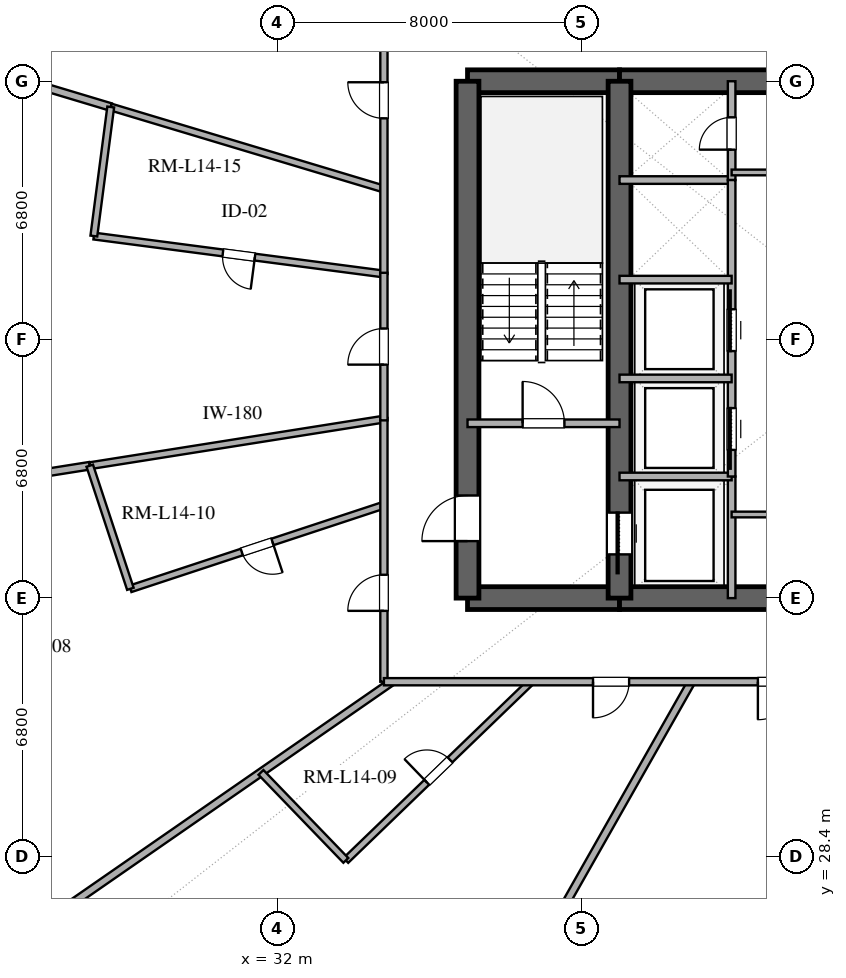
"""IFC4 building model, lengths in metres.
Left out: names, types, materials, properties, quantities, classifications, styles, units other than length and angle.
Written with IfcOpenShell. Run it as: python <this file> out.ifc"""

import sys

from ifc_helpers import new_model, si_unit, direction, frame, frame_2d, origin, place, context, subcontext, project, spatial, rectangle, extrude, element, fill, save


model = new_model("IFC4")
c1 = context("Model", 3, precision=1e-05, world=origin(), true_north=direction((0.0, 1.0)))
c2 = subcontext(c1, "Body", "Model", "MODEL_VIEW")
j1 = project(units=[si_unit("LENGTHUNIT", "METRE"), si_unit("PLANEANGLEUNIT", "RADIAN")], contexts=[c1])
p1 = place(None, origin())
s1 = spatial("IfcSite", under=j1, at=p1, CompositionType="ELEMENT")
p2 = place(p1, origin())
s2 = spatial("IfcBuilding", under=s1, at=p2, CompositionType="ELEMENT")
p3 = place(p2, frame((0.0, 0.0, 60.6)))
s3 = spatial("IfcBuildingStorey", under=s2, at=p3, CompositionType="ELEMENT", Elevation=60.6)
p4 = place(p3, frame((37.0, 35.2, 0.0), z_axis=(0.0, 0.0, 1.0), x_axis=(1.0, 0.0, 0.0)))
e1 = element("IfcWall", 1, at=p4, inside=s3, PredefinedType="SHEAR", context=c2, shape_type="SweptSolid", body=[
    extrude(rectangle(XDim=4.0, YDim=0.6, at=frame_2d((2.0, 0.0))), origin(), (0.0, 0.0, 1.0), 3.38),
])
p5 = place(p3, frame((41.0, 35.2, 0.0), z_axis=(0.0, 0.0, 1.0), x_axis=(1.0, 0.0, 0.0)))
e2 = element("IfcWall", 2, at=p5, inside=s3, PredefinedType="SHEAR", context=c2, shape_type="SweptSolid", body=[
    extrude(rectangle(XDim=14.0, YDim=0.6, at=frame_2d((7.0, 0.0))), origin(), (0.0, 0.0, 1.0), 3.38),
])
p6 = place(p5, frame((6.1, 0.0, 0.0)))
e3 = element("IfcOpeningElement", 3, at=p6, cuts=e2, PredefinedType="OPENING", context=c2, shape_type="SweptSolid", body=[
    extrude(rectangle(XDim=1.8, YDim=2.25, at=frame_2d((0.9, 1.125))), frame((0.0, 0.31, 0.0), z_axis=(0.0, -1.0, 0.0), x_axis=(1.0, 0.0, 0.0)), (0.0, 0.0, 1.0), 0.62),
])
p7 = place(p3, frame((37.0, 48.8, 0.0), z_axis=(0.0, 0.0, 1.0), x_axis=(1.0, 0.0, 0.0)))
e4 = element("IfcWall", 4, at=p7, inside=s3, PredefinedType="SHEAR", context=c2, shape_type="SweptSolid", body=[
    extrude(rectangle(XDim=4.0, YDim=0.6, at=frame_2d((2.0, 0.0))), origin(), (0.0, 0.0, 1.0), 3.38),
])
p8 = place(p3, frame((41.0, 48.8, 0.0), z_axis=(0.0, 0.0, 1.0), x_axis=(1.0, 0.0, 0.0)))
e5 = element("IfcWall", 5, at=p8, inside=s3, PredefinedType="SHEAR", context=c2, shape_type="SweptSolid", body=[
    extrude(rectangle(XDim=14.0, YDim=0.6, at=frame_2d((7.0, 0.0))), origin(), (0.0, 0.0, 1.0), 3.38),
])
p9 = place(p8, frame((6.1, 0.0, 0.0)))
e6 = element("IfcOpeningElement", 6, at=p9, cuts=e5, PredefinedType="OPENING", context=c2, shape_type="SweptSolid", body=[
    extrude(rectangle(XDim=1.8, YDim=2.25, at=frame_2d((0.9, 1.125))), frame((0.0, 0.31, 0.0), z_axis=(0.0, -1.0, 0.0), x_axis=(1.0, 0.0, 0.0)), (0.0, 0.0, 1.0), 0.62),
])
p10 = place(p3, frame((37.0, 35.2, 0.0), z_axis=(0.0, 0.0, 1.0), x_axis=(0.0, 1.0, 0.0)))
e7 = element("IfcWall", 7, at=p10, inside=s3, PredefinedType="SHEAR", context=c2, shape_type="SweptSolid", body=[
    extrude(rectangle(XDim=13.6, YDim=0.6, at=frame_2d((6.8, 0.0))), origin(), (0.0, 0.0, 1.0), 3.38),
])
p11 = place(p10, frame((1.5, 0.0, 0.0)))
e8 = element("IfcOpeningElement", 8, at=p11, cuts=e7, PredefinedType="OPENING", context=c2, shape_type="SweptSolid", body=[
    extrude(rectangle(XDim=1.2, YDim=2.15, at=frame_2d((0.6, 1.075))), frame((0.0, 0.31, 0.0), z_axis=(0.0, -1.0, 0.0), x_axis=(1.0, 0.0, 0.0)), (0.0, 0.0, 1.0), 0.62),
])
p12 = place(p3, frame((41.0, 35.2, 0.0), z_axis=(0.0, 0.0, 1.0), x_axis=(0.0, 1.0, 0.0)))
e9 = element("IfcWall", 9, at=p12, inside=s3, PredefinedType="SHEAR", context=c2, shape_type="SweptSolid", body=[
    extrude(rectangle(XDim=13.6, YDim=0.6, at=frame_2d((6.8, 0.0))), origin(), (0.0, 0.0, 1.0), 3.38),
])
p13 = place(p12, frame((1.15, 0.0, 0.0)))
e10 = element("IfcOpeningElement", 10, at=p13, cuts=e9, PredefinedType="OPENING", context=c2, shape_type="SweptSolid", body=[
    extrude(rectangle(XDim=1.1, YDim=2.2, at=frame_2d((0.55, 1.1))), frame((0.0, 0.31, 0.0), z_axis=(0.0, -1.0, 0.0), x_axis=(1.0, 0.0, 0.0)), (0.0, 0.0, 1.0), 0.62),
])
p14 = place(p3, frame((37.0, 39.8, 0.0), z_axis=(0.0, 0.0, 1.0), x_axis=(1.0, 0.0, 0.0)))
e11 = element("IfcWall", 11, at=p14, inside=s3, PredefinedType="SOLIDWALL", context=c2, shape_type="SweptSolid", body=[
    extrude(rectangle(XDim=4.0, YDim=0.2, at=frame_2d((2.0, 0.0))), origin(), (0.0, 0.0, 1.0), 2.74),
])
p15 = place(p14, frame((1.45, 0.0, 0.0)))
e12 = element("IfcOpeningElement", 12, at=p15, cuts=e11, PredefinedType="OPENING", context=c2, shape_type="SweptSolid", body=[
    extrude(rectangle(XDim=1.1, YDim=2.15, at=frame_2d((0.55, 1.075))), frame((0.0, 0.11, 0.0), z_axis=(0.0, -1.0, 0.0), x_axis=(1.0, 0.0, 0.0)), (0.0, 0.0, 1.0), 0.22),
])
p16 = place(p3, frame((43.95, 35.2, 0.0), z_axis=(0.0, 0.0, 1.0), x_axis=(0.0, 1.0, 0.0)))
e13 = element("IfcWall", 13, at=p16, inside=s3, PredefinedType="SOLIDWALL", context=c2, shape_type="SweptSolid", body=[
    extrude(rectangle(XDim=3.2, YDim=0.2, at=frame_2d((1.6, 0.0))), origin(), (0.0, 0.0, 1.0), 2.74),
])
for number, where, z_axis, x_axis in (
    (14, (41.0, 38.4, 0.0), (0.0, 0.0, 1.0), (1.0, 0.0, 0.0)),
    (15, (41.0, 46.2, 0.0), (0.0, 0.0, 1.0), (1.0, 0.0, 0.0)),
):
    element("IfcWall", number, at=place(p3, frame(where, z_axis=z_axis, x_axis=x_axis)), inside=s3, PredefinedType="SOLIDWALL", context=c2, shape_type="SweptSolid", body=[
        extrude(rectangle(XDim=2.95, YDim=0.2, at=frame_2d((1.475, 0.0))), origin(), (0.0, 0.0, 1.0), 2.74),
    ])
p17 = place(p3, frame((43.95, 46.2, 0.0), z_axis=(0.0, 0.0, 1.0), x_axis=(0.0, 1.0, 0.0)))
e16 = element("IfcWall", 16, at=p17, inside=s3, PredefinedType="SOLIDWALL", context=c2, shape_type="SweptSolid", body=[
    extrude(rectangle(XDim=2.6, YDim=0.2, at=frame_2d((1.3, 0.0))), origin(), (0.0, 0.0, 1.0), 2.74),
])
p18 = place(p17, frame((0.8, 0.0, 0.0)))
e17 = element("IfcOpeningElement", 17, at=p18, cuts=e16, PredefinedType="OPENING", context=c2, shape_type="SweptSolid", body=[
    extrude(rectangle(XDim=0.85, YDim=2.15, at=frame_2d((0.425, 1.075))), frame((0.0, 0.11, 0.0), z_axis=(0.0, -1.0, 0.0), x_axis=(1.0, 0.0, 0.0)), (0.0, 0.0, 1.0), 0.22),
])
p19 = place(p3, frame((43.95, 38.4, 0.0), z_axis=(0.0, 0.0, 1.0), x_axis=(0.0, 1.0, 0.0)))
e18 = element("IfcWall", 18, at=p19, inside=s3, PredefinedType="SOLIDWALL", context=c2, shape_type="SweptSolid", body=[
    extrude(rectangle(XDim=7.8, YDim=0.2, at=frame_2d((3.9, 0.0))), origin(), (0.0, 0.0, 1.0), 2.74),
])
p20 = place(p19, frame((0.7, 0.0, 0.0)))
e19 = element("IfcOpeningElement", 19, at=p20, cuts=e18, PredefinedType="OPENING", context=c2, shape_type="SweptSolid", body=[
    extrude(rectangle(XDim=1.1, YDim=2.2, at=frame_2d((0.55, 1.1))), frame((0.0, 0.11, 0.0), z_axis=(0.0, -1.0, 0.0), x_axis=(1.0, 0.0, 0.0)), (0.0, 0.0, 1.0), 0.22),
])
p21 = place(p19, frame((3.3, 0.0, 0.0)))
e20 = element("IfcOpeningElement", 20, at=p21, cuts=e18, PredefinedType="OPENING", context=c2, shape_type="SweptSolid", body=[
    extrude(rectangle(XDim=1.1, YDim=2.2, at=frame_2d((0.55, 1.1))), frame((0.0, 0.11, 0.0), z_axis=(0.0, -1.0, 0.0), x_axis=(1.0, 0.0, 0.0)), (0.0, 0.0, 1.0), 0.22),
])
for number, where, z_axis, x_axis in (
    (21, (41.0, 40.98, 0.0), (0.0, 0.0, 1.0), (1.0, 0.0, 0.0)),
    (22, (41.0, 43.58, 0.0), (0.0, 0.0, 1.0), (1.0, 0.0, 0.0)),
):
    element("IfcWall", number, at=place(p3, frame(where, z_axis=z_axis, x_axis=x_axis)), inside=s3, PredefinedType="SOLIDWALL", context=c2, shape_type="SweptSolid", body=[
        extrude(rectangle(XDim=2.95, YDim=0.2, at=frame_2d((1.475, 0.0))), origin(), (0.0, 0.0, 1.0), 2.74),
    ])
for number, where, z_axis, x_axis in (
    (23, (43.95, 37.4, 0.0), (0.0, 0.0, 1.0), (1.0, 0.0, 0.0)),
    (24, (43.95, 46.4, 0.0), (0.0, 0.0, 1.0), (1.0, 0.0, 0.0)),
):
    element("IfcWall", number, at=place(p3, frame(where, z_axis=z_axis, x_axis=x_axis)), inside=s3, PredefinedType="PARTITIONING", context=c2, shape_type="SweptSolid", body=[
        extrude(rectangle(XDim=2.25, YDim=0.15, at=frame_2d((1.125, 0.0))), origin(), (0.0, 0.0, 1.0), 2.74),
    ])
p22 = place(p3, frame((42.893, 33.0, 0.0), z_axis=(0.0, 0.0, 1.0), x_axis=(-0.493512300658, -0.869738816599, 0.0)))
e25 = element("IfcWall", 25, at=p22, inside=s3, PredefinedType="PARTITIONING", context=c2, shape_type="SweptSolid", body=[
    extrude(rectangle(XDim=14.938, YDim=0.2, at=frame_2d((7.469, 0.0))), origin(), (0.0, 0.0, 1.0), 2.74),
])
p23 = place(p3, frame((18.271, 37.292, 0.0), z_axis=(0.0, 0.0, 1.0), x_axis=(0.987691229297, 0.156416225401, 0.0)))
e26 = element("IfcWall", 26, at=p23, inside=s3, PredefinedType="PARTITIONING", context=c2, shape_type="SweptSolid", body=[
    extrude(rectangle(XDim=8.898, YDim=0.2, at=frame_2d((4.449, 0.0))), origin(), (0.0, 0.0, 1.0), 2.74),
])
p24 = place(p3, frame((19.184, 50.653, 0.0), z_axis=(0.0, 0.0, 1.0), x_axis=(0.957749889613, -0.287602414708, 0.0)))
e27 = element("IfcWall", 27, at=p24, inside=s3, PredefinedType="PARTITIONING", context=c2, shape_type="SweptSolid", body=[
    extrude(rectangle(XDim=8.8, YDim=0.2, at=frame_2d((4.4, 0.0))), origin(), (0.0, 0.0, 1.0), 2.74),
])
p25 = place(p3, frame((35.009, 33.0, 0.0), z_axis=(0.0, 0.0, 1.0), x_axis=(-0.821999402566, -0.569488351226, 0.0)))
e28 = element("IfcWall", 28, at=p25, inside=s3, PredefinedType="PARTITIONING", context=c2, shape_type="SweptSolid", body=[
    extrude(rectangle(XDim=12.266, YDim=0.2, at=frame_2d((6.133, 0.0))), origin(), (0.0, 0.0, 1.0), 2.74),
])
p26 = place(p3, frame((27.06, 38.683, 0.0), z_axis=(0.0, 0.0, 1.0), x_axis=(0.987690363599, 0.156421691762, 0.0)))
e29 = element("IfcWall", 29, at=p26, inside=s3, PredefinedType="PLUMBINGWALL", context=c2, shape_type="SweptSolid", body=[
    extrude(rectangle(XDim=7.837, YDim=0.18, at=frame_2d((3.918, 0.0))), origin(), (0.0, 0.0, 1.0), 2.74),
])
p27 = place(p3, frame((34.8, 43.728, 0.0), z_axis=(0.0, 0.0, 1.0), x_axis=(-0.991543548491, 0.129774386708, 0.0)))
e30 = element("IfcWall", 30, at=p27, inside=s3, PredefinedType="PLUMBINGWALL", context=c2, shape_type="SweptSolid", body=[
    extrude(rectangle(XDim=7.698, YDim=0.18, at=frame_2d((3.849, 0.0))), origin(), (0.0, 0.0, 1.0), 2.74),
])
p28 = place(p27, frame((3.424, 0.0, 0.0)))
e31 = element("IfcOpeningElement", 31, at=p28, cuts=e30, PredefinedType="OPENING", context=c2, shape_type="SweptSolid", body=[
    extrude(rectangle(XDim=0.85, YDim=2.1, at=frame_2d((0.425, 1.05))), frame((0.0, 0.1, 0.0), z_axis=(0.0, -1.0, 0.0), x_axis=(1.0, 0.0, 0.0)), (0.0, 0.0, 1.0), 0.2),
])
p29 = place(p3, frame((27.612, 48.122, 0.0), z_axis=(0.0, 0.0, 1.0), x_axis=(0.95775642604, -0.28758064674, 0.0)))
e32 = element("IfcWall", 32, at=p29, inside=s3, PredefinedType="PLUMBINGWALL", context=c2, shape_type="SweptSolid", body=[
    extrude(rectangle(XDim=7.506, YDim=0.18, at=frame_2d((3.753, 0.0))), origin(), (0.0, 0.0, 1.0), 2.74),
])
p30 = place(p3, frame((34.8, 37.646, 0.0), z_axis=(0.0, 0.0, 1.0), x_axis=(-0.949662150081, -0.313275917849, 0.0)))
e33 = element("IfcWall", 33, at=p30, inside=s3, PredefinedType="PLUMBINGWALL", context=c2, shape_type="SweptSolid", body=[
    extrude(rectangle(XDim=7.026, YDim=0.18, at=frame_2d((3.513, 0.0))), origin(), (0.0, 0.0, 1.0), 2.74),
])
p31 = place(p30, frame((3.088, 0.0, 0.0)))
e34 = element("IfcOpeningElement", 34, at=p31, cuts=e33, PredefinedType="OPENING", context=c2, shape_type="SweptSolid", body=[
    extrude(rectangle(XDim=0.85, YDim=2.1, at=frame_2d((0.425, 1.05))), frame((0.0, 0.1, 0.0), z_axis=(0.0, -1.0, 0.0), x_axis=(1.0, 0.0, 0.0)), (0.0, 0.0, 1.0), 0.2),
])
p32 = place(p3, frame((33.798, 28.299, 0.0), z_axis=(0.0, 0.0, 1.0), x_axis=(0.719667322044, 0.69431905172, 0.0)))
e35 = element("IfcWall", 35, at=p32, inside=s3, PredefinedType="PLUMBINGWALL", context=c2, shape_type="SweptSolid", body=[
    extrude(rectangle(XDim=6.771, YDim=0.18, at=frame_2d((3.385, 0.0))), origin(), (0.0, 0.0, 1.0), 2.74),
])
p33 = place(p32, frame((2.96, 0.0, 0.0)))
e36 = element("IfcOpeningElement", 36, at=p33, cuts=e35, PredefinedType="OPENING", context=c2, shape_type="SweptSolid", body=[
    extrude(rectangle(XDim=0.85, YDim=2.1, at=frame_2d((0.425, 1.05))), frame((0.0, 0.1, 0.0), z_axis=(0.0, -1.0, 0.0), x_axis=(1.0, 0.0, 0.0)), (0.0, 0.0, 1.0), 0.2),
])
p34 = place(p3, frame((34.8, 43.728, 0.0), z_axis=(0.0, 0.0, 1.0), x_axis=(0.0, 1.0, 0.0)))
e37 = element("IfcWall", 37, at=p34, inside=s3, PredefinedType="PARTITIONING", context=c2, shape_type="SweptSolid", body=[
    extrude(rectangle(XDim=7.272, YDim=0.19, at=frame_2d((3.636, 0.0))), origin(), (0.0, 0.0, 1.0), 2.74),
])
p35 = place(p34, frame((4.096, 0.0, 0.0)))
e38 = element("IfcOpeningElement", 38, at=p35, cuts=e37, PredefinedType="OPENING", context=c2, shape_type="SweptSolid", body=[
    extrude(rectangle(XDim=0.95, YDim=2.15, at=frame_2d((0.475, 1.075))), frame((0.0, 0.105, 0.0), z_axis=(0.0, -1.0, 0.0), x_axis=(1.0, 0.0, 0.0)), (0.0, 0.0, 1.0), 0.21),
])
p36 = place(p3, frame((34.8, 33.0, 0.0), z_axis=(0.0, 0.0, 1.0), x_axis=(0.0, 1.0, 0.0)))
e39 = element("IfcWall", 39, at=p36, inside=s3, PredefinedType="PARTITIONING", context=c2, shape_type="SweptSolid", body=[
    extrude(rectangle(XDim=6.942, YDim=0.19, at=frame_2d((3.471, 0.0))), origin(), (0.0, 0.0, 1.0), 2.74),
])
p37 = place(p36, frame((1.865, 0.0, 0.0)))
e40 = element("IfcOpeningElement", 40, at=p37, cuts=e39, PredefinedType="OPENING", context=c2, shape_type="SweptSolid", body=[
    extrude(rectangle(XDim=0.95, YDim=2.15, at=frame_2d((0.475, 1.075))), frame((0.0, 0.105, 0.0), z_axis=(0.0, -1.0, 0.0), x_axis=(1.0, 0.0, 0.0)), (0.0, 0.0, 1.0), 0.21),
])
p38 = place(p3, frame((47.425, 33.0, 0.0), z_axis=(0.0, 0.0, 1.0), x_axis=(-1.0, 0.0, 0.0)))
e41 = element("IfcWall", 41, at=p38, inside=s3, PredefinedType="PARTITIONING", context=c2, shape_type="SweptSolid", body=[
    extrude(rectangle(XDim=12.625, YDim=0.19, at=frame_2d((6.312, 0.0))), origin(), (0.0, 0.0, 1.0), 2.74),
])
p39 = place(p38, frame((1.784, 0.0, 0.0)))
e42 = element("IfcOpeningElement", 42, at=p39, cuts=e41, PredefinedType="OPENING", context=c2, shape_type="SweptSolid", body=[
    extrude(rectangle(XDim=1.0, YDim=2.2, at=frame_2d((0.5, 1.1))), frame((0.0, 0.105, 0.0), z_axis=(0.0, -1.0, 0.0), x_axis=(1.0, 0.0, 0.0)), (0.0, 0.0, 1.0), 0.21),
])
p40 = place(p38, frame((6.173, 0.0, 0.0)))
e43 = element("IfcOpeningElement", 43, at=p40, cuts=e41, PredefinedType="OPENING", context=c2, shape_type="SweptSolid", body=[
    extrude(rectangle(XDim=0.95, YDim=2.15, at=frame_2d((0.475, 1.075))), frame((0.0, 0.105, 0.0), z_axis=(0.0, -1.0, 0.0), x_axis=(1.0, 0.0, 0.0)), (0.0, 0.0, 1.0), 0.21),
])
p41 = place(p3, frame((34.8, 39.877, 0.0), z_axis=(0.0, 0.0, 1.0), x_axis=(0.0, 1.0, 0.0)))
e44 = element("IfcWall", 44, at=p41, inside=s3, PredefinedType="PARTITIONING", context=c2, shape_type="SweptSolid", body=[
    extrude(rectangle(XDim=3.883, YDim=0.19, at=frame_2d((1.941, 0.0))), origin(), (0.0, 0.0, 1.0), 2.74),
])
p42 = place(p41, frame((1.467, 0.0, 0.0)))
e45 = element("IfcOpeningElement", 45, at=p42, cuts=e44, PredefinedType="OPENING", context=c2, shape_type="SweptSolid", body=[
    extrude(rectangle(XDim=0.95, YDim=2.15, at=frame_2d((0.475, 1.075))), frame((0.0, 0.105, 0.0), z_axis=(0.0, -1.0, 0.0), x_axis=(1.0, 0.0, 0.0)), (0.0, 0.0, 1.0), 0.21),
])
p43 = place(p3, frame((27.167, 44.727, 0.0), z_axis=(0.0, 0.0, 1.0), x_axis=(0.129823772588, 0.991537083558, 0.0)))
e46 = element("IfcWall", 46, at=p43, inside=s3, PredefinedType="PLUMBINGWALL", context=c2, shape_type="SweptSolid", body=[
    extrude(rectangle(XDim=3.425, YDim=0.18, at=frame_2d((1.712, 0.0))), origin(), (0.0, 0.0, 1.0), 2.74),
])
p44 = place(p3, frame((28.128, 35.445, 0.0), z_axis=(0.0, 0.0, 1.0), x_axis=(-0.313262541659, 0.949666562533, 0.0)))
e47 = element("IfcWall", 47, at=p44, inside=s3, PredefinedType="PLUMBINGWALL", context=c2, shape_type="SweptSolid", body=[
    extrude(rectangle(XDim=3.41, YDim=0.18, at=frame_2d((1.705, 0.0))), origin(), (0.0, 0.0, 1.0), 2.74),
])
p45 = place(p3, frame((31.565, 30.614, 0.0), z_axis=(0.0, 0.0, 1.0), x_axis=(0.694278833189, -0.719706121821, 0.0)))
e48 = element("IfcWall", 48, at=p45, inside=s3, PredefinedType="PLUMBINGWALL", context=c2, shape_type="SweptSolid", body=[
    extrude(rectangle(XDim=3.217, YDim=0.18, at=frame_2d((1.608, 0.0))), origin(), (0.0, 0.0, 1.0), 2.74),
])
p46 = place(p13, origin())
e49 = element("IfcDoor", 49, at=p46, inside=s3, OperationType="SLIDING_TO_LEFT", PredefinedType="DOOR", context=c2, shape_type="SweptSolid", body=[
    extrude(rectangle(XDim=1.1, YDim=2.2, at=frame_2d((0.55, 1.1))), frame((0.0, 0.025, 0.0), z_axis=(0.0, -1.0, 0.0), x_axis=(1.0, 0.0, 0.0)), (0.0, 0.0, 1.0), 0.05),
])
fill(e10, e49)
p47 = place(p11, origin())
e50 = element("IfcDoor", 50, at=p47, inside=s3, OperationType="SINGLE_SWING_LEFT", PredefinedType="DOOR", context=c2, shape_type="SweptSolid", body=[
    extrude(rectangle(XDim=1.2, YDim=2.15, at=frame_2d((0.6, 1.075))), frame((0.0, 0.025, 0.0), z_axis=(0.0, -1.0, 0.0), x_axis=(1.0, 0.0, 0.0)), (0.0, 0.0, 1.0), 0.05),
])
fill(e8, e50)
p48 = place(p15, origin())
e51 = element("IfcDoor", 51, at=p48, inside=s3, OperationType="SINGLE_SWING_LEFT", PredefinedType="DOOR", context=c2, shape_type="SweptSolid", body=[
    extrude(rectangle(XDim=1.1, YDim=2.15, at=frame_2d((0.55, 1.075))), frame((0.0, 0.025, 0.0), z_axis=(0.0, -1.0, 0.0), x_axis=(1.0, 0.0, 0.0)), (0.0, 0.0, 1.0), 0.05),
])
fill(e12, e51)
p49 = place(p18, origin())
e52 = element("IfcDoor", 52, at=p49, inside=s3, OperationType="SINGLE_SWING_LEFT", PredefinedType="DOOR", context=c2, shape_type="SweptSolid", body=[
    extrude(rectangle(XDim=0.85, YDim=2.15, at=frame_2d((0.425, 1.075))), frame((0.0, 0.025, 0.0), z_axis=(0.0, -1.0, 0.0), x_axis=(1.0, 0.0, 0.0)), (0.0, 0.0, 1.0), 0.05),
])
fill(e17, e52)
p50 = place(p20, origin())
e53 = element("IfcDoor", 53, at=p50, inside=s3, OperationType="SLIDING_TO_LEFT", PredefinedType="DOOR", context=c2, shape_type="SweptSolid", body=[
    extrude(rectangle(XDim=1.1, YDim=2.2, at=frame_2d((0.55, 1.1))), frame((0.0, 0.025, 0.0), z_axis=(0.0, -1.0, 0.0), x_axis=(1.0, 0.0, 0.0)), (0.0, 0.0, 1.0), 0.05),
])
fill(e19, e53)
p51 = place(p21, origin())
e54 = element("IfcDoor", 54, at=p51, inside=s3, OperationType="SLIDING_TO_RIGHT", PredefinedType="DOOR", context=c2, shape_type="SweptSolid", body=[
    extrude(rectangle(XDim=1.1, YDim=2.2, at=frame_2d((0.55, 1.1))), frame((0.0, 0.025, 0.0), z_axis=(0.0, -1.0, 0.0), x_axis=(1.0, 0.0, 0.0)), (0.0, 0.0, 1.0), 0.05),
])
fill(e20, e54)
p52 = place(p28, origin())
e55 = element("IfcDoor", 55, at=p52, inside=s3, OperationType="SINGLE_SWING_LEFT", PredefinedType="DOOR", context=c2, shape_type="SweptSolid", body=[
    extrude(rectangle(XDim=0.85, YDim=2.1, at=frame_2d((0.425, 1.05))), frame((0.0, 0.025, 0.0), z_axis=(0.0, -1.0, 0.0), x_axis=(1.0, 0.0, 0.0)), (0.0, 0.0, 1.0), 0.05),
])
fill(e31, e55)
p53 = place(p31, origin())
e56 = element("IfcDoor", 56, at=p53, inside=s3, OperationType="SINGLE_SWING_LEFT", PredefinedType="DOOR", context=c2, shape_type="SweptSolid", body=[
    extrude(rectangle(XDim=0.85, YDim=2.1, at=frame_2d((0.425, 1.05))), frame((0.0, 0.025, 0.0), z_axis=(0.0, -1.0, 0.0), x_axis=(1.0, 0.0, 0.0)), (0.0, 0.0, 1.0), 0.05),
])
fill(e34, e56)
p54 = place(p33, origin())
e57 = element("IfcDoor", 57, at=p54, inside=s3, OperationType="SINGLE_SWING_LEFT", PredefinedType="DOOR", context=c2, shape_type="SweptSolid", body=[
    extrude(rectangle(XDim=0.85, YDim=2.1, at=frame_2d((0.425, 1.05))), frame((0.0, 0.025, 0.0), z_axis=(0.0, -1.0, 0.0), x_axis=(1.0, 0.0, 0.0)), (0.0, 0.0, 1.0), 0.05),
])
fill(e36, e57)
p55 = place(p35, origin())
e58 = element("IfcDoor", 58, at=p55, inside=s3, OperationType="SINGLE_SWING_RIGHT", PredefinedType="DOOR", context=c2, shape_type="SweptSolid", body=[
    extrude(rectangle(XDim=0.95, YDim=2.15, at=frame_2d((0.475, 1.075))), frame((0.0, 0.025, 0.0), z_axis=(0.0, -1.0, 0.0), x_axis=(1.0, 0.0, 0.0)), (0.0, 0.0, 1.0), 0.05),
])
fill(e38, e58)
p56 = place(p37, origin())
e59 = element("IfcDoor", 59, at=p56, inside=s3, OperationType="SINGLE_SWING_LEFT", PredefinedType="DOOR", context=c2, shape_type="SweptSolid", body=[
    extrude(rectangle(XDim=0.95, YDim=2.15, at=frame_2d((0.475, 1.075))), frame((0.0, 0.025, 0.0), z_axis=(0.0, -1.0, 0.0), x_axis=(1.0, 0.0, 0.0)), (0.0, 0.0, 1.0), 0.05),
])
fill(e40, e59)
p57 = place(p39, origin())
e60 = element("IfcDoor", 60, at=p57, inside=s3, OperationType="SINGLE_SWING_RIGHT", PredefinedType="DOOR", context=c2, shape_type="SweptSolid", body=[
    extrude(rectangle(XDim=1.0, YDim=2.2, at=frame_2d((0.5, 1.1))), frame((0.0, 0.025, 0.0), z_axis=(0.0, -1.0, 0.0), x_axis=(1.0, 0.0, 0.0)), (0.0, 0.0, 1.0), 0.05),
])
fill(e42, e60)
p58 = place(p40, origin())
e61 = element("IfcDoor", 61, at=p58, inside=s3, OperationType="SINGLE_SWING_RIGHT", PredefinedType="DOOR", context=c2, shape_type="SweptSolid", body=[
    extrude(rectangle(XDim=0.95, YDim=2.15, at=frame_2d((0.475, 1.075))), frame((0.0, 0.025, 0.0), z_axis=(0.0, -1.0, 0.0), x_axis=(1.0, 0.0, 0.0)), (0.0, 0.0, 1.0), 0.05),
])
fill(e43, e61)
p59 = place(p42, origin())
e62 = element("IfcDoor", 62, at=p59, inside=s3, OperationType="SINGLE_SWING_LEFT", PredefinedType="DOOR", context=c2, shape_type="SweptSolid", body=[
    extrude(rectangle(XDim=0.95, YDim=2.15, at=frame_2d((0.475, 1.075))), frame((0.0, 0.025, 0.0), z_axis=(0.0, -1.0, 0.0), x_axis=(1.0, 0.0, 0.0)), (0.0, 0.0, 1.0), 0.05),
])
fill(e45, e62)
save(model, sys.argv[1])
